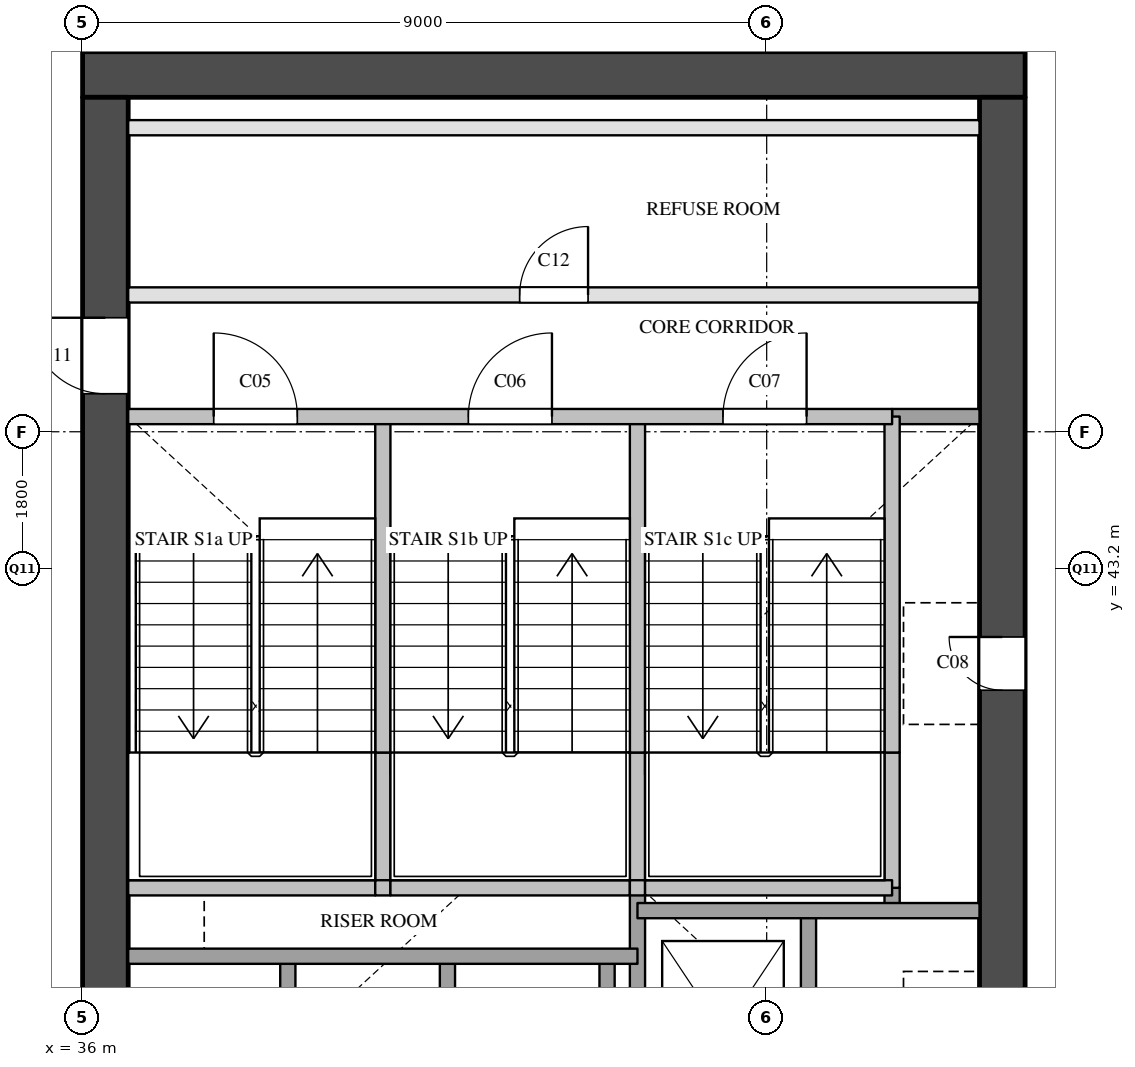
"""IFC4 building model, lengths in metres.
Left out: names, types, materials, properties, quantities, classifications, styles, units other than length and angle.
Written with IfcOpenShell. Run it as: python <this file> out.ifc"""

import sys

from ifc_helpers import new_model, si_unit, direction, frame, frame_2d, origin, place, context, subcontext, project, spatial, rectangle, extrude, element, fill, save


model = new_model("IFC4")
c1 = context("Model", 3, precision=1e-05, world=origin(), true_north=direction((0.0, 1.0)))
c2 = subcontext(c1, "Body", "Model", "MODEL_VIEW")
j1 = project(units=[si_unit("LENGTHUNIT", "METRE"), si_unit("PLANEANGLEUNIT", "RADIAN")], contexts=[c1])
p1 = place(None, origin())
s1 = spatial("IfcSite", under=j1, at=p1, CompositionType="ELEMENT")
p2 = place(p1, origin())
s2 = spatial("IfcBuilding", under=s1, at=p2, CompositionType="ELEMENT")
p3 = place(p2, frame((0.0, 0.0, 93.0)))
s3 = spatial("IfcBuildingStorey", under=s2, at=p3, CompositionType="ELEMENT", Elevation=93.0)
p4 = place(p3, frame((36.0, 49.7, 0.0), z_axis=(0.0, 0.0, 1.0), x_axis=(1.0, 0.0, 0.0)))
e1 = element("IfcWall", 1, at=p4, inside=s3, PredefinedType="SHEAR", context=c2, shape_type="SweptSolid", body=[
    extrude(rectangle(XDim=12.4, YDim=0.6, at=frame_2d((6.2, 0.0))), origin(), (0.0, 0.0, 1.0), 3.5),
])
p5 = place(p3, frame((36.3, 29.1, 0.0), z_axis=(0.0, 0.0, 1.0), x_axis=(0.0, 1.0, 0.0)))
e2 = element("IfcWall", 2, at=p5, inside=s3, PredefinedType="SHEAR", context=c2, shape_type="SweptSolid", body=[
    extrude(rectangle(XDim=20.3, YDim=0.6, at=frame_2d((10.15, 0.0))), origin(), (0.0, 0.0, 1.0), 3.5),
])
p6 = place(p5, frame((3.6, 0.0, 0.0)))
e3 = element("IfcOpeningElement", 3, at=p6, cuts=e2, PredefinedType="OPENING", context=c2, shape_type="SweptSolid", body=[
    extrude(rectangle(XDim=1.8, YDim=2.1, at=frame_2d((0.9, 1.05))), frame((0.0, 0.31, 0.0), z_axis=(0.0, -1.0, 0.0), x_axis=(1.0, 0.0, 0.0)), (0.0, 0.0, 1.0), 0.62),
])
p7 = place(p5, frame((16.4, 0.0, 0.0)))
e4 = element("IfcOpeningElement", 4, at=p7, cuts=e2, PredefinedType="OPENING", context=c2, shape_type="SweptSolid", body=[
    extrude(rectangle(XDim=1.0, YDim=2.1, at=frame_2d((0.5, 1.05))), frame((0.0, 0.31, 0.0), z_axis=(0.0, -1.0, 0.0), x_axis=(1.0, 0.0, 0.0)), (0.0, 0.0, 1.0), 0.62),
])
p8 = place(p3, frame((48.1, 29.1, 0.0), z_axis=(0.0, 0.0, 1.0), x_axis=(0.0, 1.0, 0.0)))
e5 = element("IfcWall", 5, at=p8, inside=s3, PredefinedType="SHEAR", context=c2, shape_type="SweptSolid", body=[
    extrude(rectangle(XDim=20.3, YDim=0.6, at=frame_2d((10.15, 0.0))), origin(), (0.0, 0.0, 1.0), 3.5),
])
p9 = place(p8, frame((12.5, 0.0, 0.0)))
e6 = element("IfcOpeningElement", 6, at=p9, cuts=e5, PredefinedType="OPENING", context=c2, shape_type="SweptSolid", body=[
    extrude(rectangle(XDim=0.7, YDim=2.1, at=frame_2d((0.35, 1.05))), frame((0.0, 0.31, 0.0), z_axis=(0.0, -1.0, 0.0), x_axis=(1.0, 0.0, 0.0)), (0.0, 0.0, 1.0), 0.62),
])
p10 = place(p8, frame((3.9, 0.0, 0.0)))
e7 = element("IfcOpeningElement", 7, at=p10, cuts=e5, PredefinedType="OPENING", context=c2, shape_type="SweptSolid", body=[
    extrude(rectangle(XDim=1.8, YDim=2.1, at=frame_2d((0.9, 1.05))), frame((0.0, 0.31, 0.0), z_axis=(0.0, -1.0, 0.0), x_axis=(1.0, 0.0, 0.0)), (0.0, 0.0, 1.0), 0.62),
])
p11 = place(p3, frame((38.7, 34.9, 0.0), z_axis=(0.0, 0.0, 1.0), x_axis=(0.0, 1.0, 0.0)))
e8 = element("IfcWall", 8, at=p11, inside=s3, PredefinedType="SOLIDWALL", context=c2, shape_type="SweptSolid", body=[
    extrude(rectangle(XDim=3.2, YDim=0.2, at=frame_2d((1.6, 0.0))), origin(), (0.0, 0.0, 1.0), 3.5),
])
p12 = place(p3, frame((39.95, 39.0, 0.0), z_axis=(0.0, 0.0, 1.0), x_axis=(0.0, 1.0, 0.0)))
e9 = element("IfcWall", 9, at=p12, inside=s3, PredefinedType="SOLIDWALL", context=c2, shape_type="SweptSolid", body=[
    extrude(rectangle(XDim=1.78, YDim=0.2, at=frame_2d((0.89, 0.0))), origin(), (0.0, 0.0, 1.0), 3.5),
])
p13 = place(p3, frame((39.95, 40.78, 0.0), z_axis=(0.0, 0.0, 1.0), x_axis=(0.0, 1.0, 0.0)))
e10 = element("IfcWall", 10, at=p13, inside=s3, PredefinedType="SOLIDWALL", context=c2, shape_type="SweptSolid", body=[
    extrude(rectangle(XDim=4.42, YDim=0.2, at=frame_2d((2.21, 0.0))), origin(), (0.0, 0.0, 1.0), 3.5),
])
for number, where, z_axis, x_axis in (
    (11, (40.8, 34.9, 0.0), (0.0, 0.0, 1.0), (0.0, 1.0, 0.0)),
    (12, (42.9, 34.9, 0.0), (0.0, 0.0, 1.0), (0.0, 1.0, 0.0)),
):
    element("IfcWall", number, at=place(p3, frame(where, z_axis=z_axis, x_axis=x_axis)), inside=s3, PredefinedType="SOLIDWALL", context=c2, shape_type="SweptSolid", body=[
        extrude(rectangle(XDim=3.2, YDim=0.2, at=frame_2d((1.6, 0.0))), origin(), (0.0, 0.0, 1.0), 3.5),
    ])
p14 = place(p3, frame((43.3, 29.1, 0.0), z_axis=(0.0, 0.0, 1.0), x_axis=(0.0, 1.0, 0.0)))
e13 = element("IfcWall", 13, at=p14, inside=s3, PredefinedType="SOLIDWALL", context=c2, shape_type="SweptSolid", body=[
    extrude(rectangle(XDim=9.9, YDim=0.2, at=frame_2d((4.95, 0.0))), origin(), (0.0, 0.0, 1.0), 3.5),
])
p15 = place(p3, frame((43.3, 39.0, 0.0), z_axis=(0.0, 0.0, 1.0), x_axis=(0.0, 1.0, 0.0)))
e14 = element("IfcWall", 14, at=p15, inside=s3, PredefinedType="SOLIDWALL", context=c2, shape_type="SweptSolid", body=[
    extrude(rectangle(XDim=1.78, YDim=0.2, at=frame_2d((0.89, 0.0))), origin(), (0.0, 0.0, 1.0), 3.5),
])
p16 = place(p3, frame((43.3, 40.78, 0.0), z_axis=(0.0, 0.0, 1.0), x_axis=(0.0, 1.0, 0.0)))
e15 = element("IfcWall", 15, at=p16, inside=s3, PredefinedType="SOLIDWALL", context=c2, shape_type="SweptSolid", body=[
    extrude(rectangle(XDim=4.42, YDim=0.2, at=frame_2d((2.21, 0.0))), origin(), (0.0, 0.0, 1.0), 3.5),
])
p17 = place(p3, frame((45.55, 35.5, 0.0), z_axis=(0.0, 0.0, 1.0), x_axis=(0.0, 1.0, 0.0)))
e16 = element("IfcWall", 16, at=p17, inside=s3, PredefinedType="SOLIDWALL", context=c2, shape_type="SweptSolid", body=[
    extrude(rectangle(XDim=3.2, YDim=0.2, at=frame_2d((1.6, 0.0))), origin(), (0.0, 0.0, 1.0), 3.5),
])
p18 = place(p3, frame((46.65, 38.7, 0.0), z_axis=(0.0, 0.0, 1.0), x_axis=(0.0, 1.0, 0.0)))
e17 = element("IfcWall", 17, at=p18, inside=s3, PredefinedType="SOLIDWALL", context=c2, shape_type="SweptSolid", body=[
    extrude(rectangle(XDim=0.3, YDim=0.2, at=frame_2d((0.15, 0.0))), origin(), (0.0, 0.0, 1.0), 3.5),
])
p19 = place(p3, frame((46.65, 39.0, 0.0), z_axis=(0.0, 0.0, 1.0), x_axis=(0.0, 1.0, 0.0)))
e18 = element("IfcWall", 18, at=p19, inside=s3, PredefinedType="SOLIDWALL", context=c2, shape_type="SweptSolid", body=[
    extrude(rectangle(XDim=1.78, YDim=0.2, at=frame_2d((0.89, 0.0))), origin(), (0.0, 0.0, 1.0), 3.5),
])
p20 = place(p3, frame((46.65, 40.78, 0.0), z_axis=(0.0, 0.0, 1.0), x_axis=(0.0, 1.0, 0.0)))
e19 = element("IfcWall", 19, at=p20, inside=s3, PredefinedType="SOLIDWALL", context=c2, shape_type="SweptSolid", body=[
    extrude(rectangle(XDim=4.42, YDim=0.2, at=frame_2d((2.21, 0.0))), origin(), (0.0, 0.0, 1.0), 3.5),
])
p21 = place(p3, frame((36.6, 38.1, 0.0), z_axis=(0.0, 0.0, 1.0), x_axis=(1.0, 0.0, 0.0)))
e20 = element("IfcWall", 20, at=p21, inside=s3, PredefinedType="SOLIDWALL", context=c2, shape_type="SweptSolid", body=[
    extrude(rectangle(XDim=6.7, YDim=0.2, at=frame_2d((3.35, 0.0))), origin(), (0.0, 0.0, 1.0), 3.5),
])
p22 = place(p3, frame((43.3, 38.7, 0.0), z_axis=(0.0, 0.0, 1.0), x_axis=(1.0, 0.0, 0.0)))
e21 = element("IfcWall", 21, at=p22, inside=s3, PredefinedType="SOLIDWALL", context=c2, shape_type="SweptSolid", body=[
    extrude(rectangle(XDim=4.5, YDim=0.2, at=frame_2d((2.25, 0.0))), origin(), (0.0, 0.0, 1.0), 3.5),
])
p23 = place(p3, frame((36.6, 39.0, 0.0), z_axis=(0.0, 0.0, 1.0), x_axis=(1.0, 0.0, 0.0)))
e22 = element("IfcWall", 22, at=p23, inside=s3, PredefinedType="SOLIDWALL", context=c2, shape_type="SweptSolid", body=[
    extrude(rectangle(XDim=3.25, YDim=0.2, at=frame_2d((1.625, 0.0))), origin(), (0.0, 0.0, 1.0), 3.5),
])
p24 = place(p3, frame((39.85, 39.0, 0.0), z_axis=(0.0, 0.0, 1.0), x_axis=(1.0, 0.0, 0.0)))
e23 = element("IfcWall", 23, at=p24, inside=s3, PredefinedType="SOLIDWALL", context=c2, shape_type="SweptSolid", body=[
    extrude(rectangle(XDim=0.2, YDim=0.2, at=frame_2d((0.1, 0.0))), origin(), (0.0, 0.0, 1.0), 3.5),
])
p25 = place(p3, frame((40.05, 39.0, 0.0), z_axis=(0.0, 0.0, 1.0), x_axis=(1.0, 0.0, 0.0)))
e24 = element("IfcWall", 24, at=p25, inside=s3, PredefinedType="SOLIDWALL", context=c2, shape_type="SweptSolid", body=[
    extrude(rectangle(XDim=3.15, YDim=0.2, at=frame_2d((1.575, 0.0))), origin(), (0.0, 0.0, 1.0), 3.5),
])
p26 = place(p3, frame((43.2, 39.0, 0.0), z_axis=(0.0, 0.0, 1.0), x_axis=(1.0, 0.0, 0.0)))
e25 = element("IfcWall", 25, at=p26, inside=s3, PredefinedType="SOLIDWALL", context=c2, shape_type="SweptSolid", body=[
    extrude(rectangle(XDim=0.2, YDim=0.2, at=frame_2d((0.1, 0.0))), origin(), (0.0, 0.0, 1.0), 3.5),
])
p27 = place(p3, frame((43.4, 39.0, 0.0), z_axis=(0.0, 0.0, 1.0), x_axis=(1.0, 0.0, 0.0)))
e26 = element("IfcWall", 26, at=p27, inside=s3, PredefinedType="SOLIDWALL", context=c2, shape_type="SweptSolid", body=[
    extrude(rectangle(XDim=3.25, YDim=0.2, at=frame_2d((1.625, 0.0))), origin(), (0.0, 0.0, 1.0), 3.5),
])
p28 = place(p3, frame((46.65, 45.2, 0.0), z_axis=(0.0, 0.0, 1.0), x_axis=(1.0, 0.0, 0.0)))
e27 = element("IfcWall", 27, at=p28, inside=s3, PredefinedType="SOLIDWALL", context=c2, shape_type="SweptSolid", body=[
    extrude(rectangle(XDim=1.15, YDim=0.2, at=frame_2d((0.575, 0.0))), origin(), (0.0, 0.0, 1.0), 3.5),
])
p29 = place(p3, frame((36.6, 45.2, 0.0), z_axis=(0.0, 0.0, 1.0), x_axis=(1.0, 0.0, 0.0)))
e28 = element("IfcWall", 28, at=p29, inside=s3, PredefinedType="SOLIDWALL", context=c2, shape_type="SweptSolid", body=[
    extrude(rectangle(XDim=10.05, YDim=0.2, at=frame_2d((5.025, 0.0))), origin(), (0.0, 0.0, 1.0), 3.5),
])
p30 = place(p29, frame((1.125, 0.0, 0.0)))
e29 = element("IfcOpeningElement", 29, at=p30, cuts=e28, PredefinedType="OPENING", context=c2, shape_type="SweptSolid", body=[
    extrude(rectangle(XDim=1.1, YDim=2.1, at=frame_2d((0.55, 1.05))), frame((0.0, 0.11, 0.0), z_axis=(0.0, -1.0, 0.0), x_axis=(1.0, 0.0, 0.0)), (0.0, 0.0, 1.0), 0.22),
])
p31 = place(p29, frame((4.475, 0.0, 0.0)))
e30 = element("IfcOpeningElement", 30, at=p31, cuts=e28, PredefinedType="OPENING", context=c2, shape_type="SweptSolid", body=[
    extrude(rectangle(XDim=1.1, YDim=2.1, at=frame_2d((0.55, 1.05))), frame((0.0, 0.11, 0.0), z_axis=(0.0, -1.0, 0.0), x_axis=(1.0, 0.0, 0.0)), (0.0, 0.0, 1.0), 0.22),
])
p32 = place(p29, frame((7.825, 0.0, 0.0)))
e31 = element("IfcOpeningElement", 31, at=p32, cuts=e28, PredefinedType="OPENING", context=c2, shape_type="SweptSolid", body=[
    extrude(rectangle(XDim=1.1, YDim=2.1, at=frame_2d((0.55, 1.05))), frame((0.0, 0.11, 0.0), z_axis=(0.0, -1.0, 0.0), x_axis=(1.0, 0.0, 0.0)), (0.0, 0.0, 1.0), 0.22),
])
p33 = place(p3, frame((36.6, 46.8, 0.0), z_axis=(0.0, 0.0, 1.0), x_axis=(1.0, 0.0, 0.0)))
e32 = element("IfcWall", 32, at=p33, inside=s3, PredefinedType="PARTITIONING", context=c2, shape_type="SweptSolid", body=[
    extrude(rectangle(XDim=11.2, YDim=0.2, at=frame_2d((5.6, 0.0))), origin(), (0.0, 0.0, 1.0), 3.5),
])
p34 = place(p33, frame((5.15, 0.0, 0.0)))
e33 = element("IfcOpeningElement", 33, at=p34, cuts=e32, PredefinedType="OPENING", context=c2, shape_type="SweptSolid", body=[
    extrude(rectangle(XDim=0.9, YDim=2.1, at=frame_2d((0.45, 1.05))), frame((0.0, 0.11, 0.0), z_axis=(0.0, -1.0, 0.0), x_axis=(1.0, 0.0, 0.0)), (0.0, 0.0, 1.0), 0.22),
])
p35 = place(p3, frame((36.6, 49.0, 0.0), z_axis=(0.0, 0.0, 1.0), x_axis=(1.0, 0.0, 0.0)))
e34 = element("IfcWall", 34, at=p35, inside=s3, PredefinedType="PARTITIONING", context=c2, shape_type="SweptSolid", body=[
    extrude(rectangle(XDim=11.2, YDim=0.2, at=frame_2d((5.6, 0.0))), origin(), (0.0, 0.0, 1.0), 3.5),
])
p36 = place(p30, origin())
e35 = element("IfcDoor", 35, at=p36, inside=s3, OperationType="SINGLE_SWING_LEFT", PredefinedType="DOOR", context=c2, shape_type="SweptSolid", body=[
    extrude(rectangle(XDim=1.1, YDim=2.1, at=frame_2d((0.55, 1.05))), frame((0.0, 0.025, 0.0), z_axis=(0.0, -1.0, 0.0), x_axis=(1.0, 0.0, 0.0)), (0.0, 0.0, 1.0), 0.05),
])
fill(e29, e35)
p37 = place(p31, origin())
e36 = element("IfcDoor", 36, at=p37, inside=s3, OperationType="SINGLE_SWING_RIGHT", PredefinedType="DOOR", context=c2, shape_type="SweptSolid", body=[
    extrude(rectangle(XDim=1.1, YDim=2.1, at=frame_2d((0.55, 1.05))), frame((0.0, 0.025, 0.0), z_axis=(0.0, -1.0, 0.0), x_axis=(1.0, 0.0, 0.0)), (0.0, 0.0, 1.0), 0.05),
])
fill(e30, e36)
p38 = place(p32, origin())
e37 = element("IfcDoor", 37, at=p38, inside=s3, OperationType="SINGLE_SWING_RIGHT", PredefinedType="DOOR", context=c2, shape_type="SweptSolid", body=[
    extrude(rectangle(XDim=1.1, YDim=2.1, at=frame_2d((0.55, 1.05))), frame((0.0, 0.025, 0.0), z_axis=(0.0, -1.0, 0.0), x_axis=(1.0, 0.0, 0.0)), (0.0, 0.0, 1.0), 0.05),
])
fill(e31, e37)
p39 = place(p9, origin())
e38 = element("IfcDoor", 38, at=p39, inside=s3, OperationType="SINGLE_SWING_RIGHT", PredefinedType="DOOR", context=c2, shape_type="SweptSolid", body=[
    extrude(rectangle(XDim=0.7, YDim=2.1, at=frame_2d((0.35, 1.05))), frame((0.0, 0.025, 0.0), z_axis=(0.0, -1.0, 0.0), x_axis=(1.0, 0.0, 0.0)), (0.0, 0.0, 1.0), 0.05),
])
fill(e6, e38)
p40 = place(p7, origin())
e39 = element("IfcDoor", 39, at=p40, inside=s3, OperationType="SINGLE_SWING_RIGHT", PredefinedType="DOOR", context=c2, shape_type="SweptSolid", body=[
    extrude(rectangle(XDim=1.0, YDim=2.1, at=frame_2d((0.5, 1.05))), frame((0.0, 0.025, 0.0), z_axis=(0.0, -1.0, 0.0), x_axis=(1.0, 0.0, 0.0)), (0.0, 0.0, 1.0), 0.05),
])
fill(e4, e39)
p41 = place(p34, origin())
e40 = element("IfcDoor", 40, at=p41, inside=s3, OperationType="SINGLE_SWING_RIGHT", PredefinedType="DOOR", context=c2, shape_type="SweptSolid", body=[
    extrude(rectangle(XDim=0.9, YDim=2.1, at=frame_2d((0.45, 1.05))), frame((0.0, 0.025, 0.0), z_axis=(0.0, -1.0, 0.0), x_axis=(1.0, 0.0, 0.0)), (0.0, 0.0, 1.0), 0.05),
])
fill(e33, e40)
save(model, sys.argv[1])
